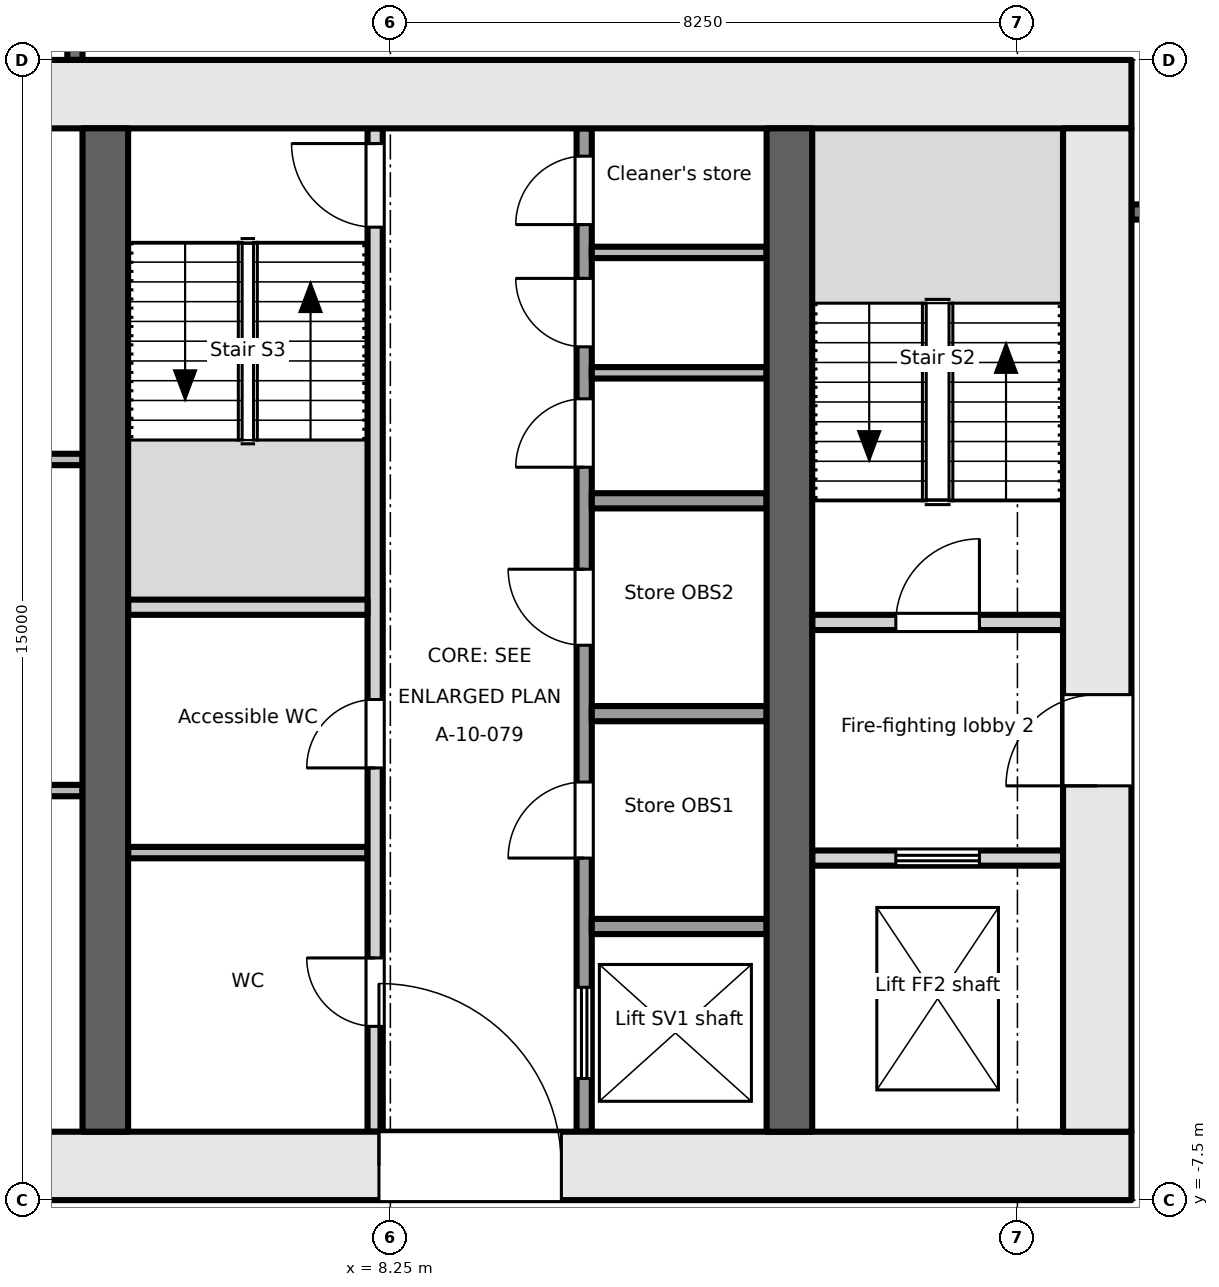
"""IFC4 building model, lengths in metres.
Left out: names, types, materials, properties, quantities, classifications, styles, units other than length and angle.
Written with IfcOpenShell. Run it as: python <this file> out.ifc"""

import sys

from ifc_helpers import new_model, si_unit, direction, frame, frame_2d, origin, place, context, subcontext, project, spatial, rectangle, extrude, element, fill, save


model = new_model("IFC4")
c1 = context("Model", 3, precision=1e-05, world=origin(), true_north=direction((0.0, 1.0)))
c2 = subcontext(c1, "Body", "Model", "MODEL_VIEW")
j1 = project(units=[si_unit("LENGTHUNIT", "METRE"), si_unit("PLANEANGLEUNIT", "RADIAN")], contexts=[c1])
p1 = place(None, origin())
s1 = spatial("IfcSite", under=j1, at=p1, CompositionType="ELEMENT")
p2 = place(p1, origin())
s2 = spatial("IfcBuilding", under=s1, at=p2, CompositionType="ELEMENT")
p3 = place(p2, frame((0.0, 0.0, -9.5)))
s3 = spatial("IfcBuildingStorey", under=s2, at=p3, CompositionType="ELEMENT", Elevation=-9.5)
p4 = place(p3, frame((-18.0, -7.05, -0.2), z_axis=(0.0, 0.0, 1.0), x_axis=(1.0, 0.0, 0.0)))
e1 = element("IfcWall", 1, at=p4, inside=s3, PredefinedType="SHEAR", context=c2, shape_type="SweptSolid", body=[
    extrude(rectangle(XDim=36.0, YDim=0.9, at=frame_2d((18.0, 0.0))), origin(), (0.0, 0.0, 1.0), 4.0),
])
p5 = place(p4, frame((8.4, 0.0, 0.2)))
e2 = element("IfcOpeningElement", 2, at=p5, cuts=e1, PredefinedType="OPENING", context=c2, shape_type="SweptSolid", body=[
    extrude(rectangle(XDim=1.2, YDim=2.1, at=frame_2d((0.6, 1.05))), frame((0.0, 0.46, 0.0), z_axis=(0.0, -1.0, 0.0), x_axis=(1.0, 0.0, 0.0)), (0.0, 0.0, 1.0), 0.921),
])
p6 = place(p4, frame((13.9, 0.0, 0.2)))
e3 = element("IfcOpeningElement", 3, at=p6, cuts=e1, PredefinedType="OPENING", context=c2, shape_type="SweptSolid", body=[
    extrude(rectangle(XDim=1.8, YDim=2.1, at=frame_2d((0.9, 1.05))), frame((0.0, 0.46, 0.0), z_axis=(0.0, -1.0, 0.0), x_axis=(1.0, 0.0, 0.0)), (0.0, 0.0, 1.0), 0.921),
])
p7 = place(p4, frame((26.1, 0.0, 0.2)))
e4 = element("IfcOpeningElement", 4, at=p7, cuts=e1, PredefinedType="OPENING", context=c2, shape_type="SweptSolid", body=[
    extrude(rectangle(XDim=2.4, YDim=2.1, at=frame_2d((1.2, 1.05))), frame((0.0, 0.46, 0.0), z_axis=(0.0, -1.0, 0.0), x_axis=(1.0, 0.0, 0.0)), (0.0, 0.0, 1.0), 0.921),
])
p8 = place(p3, frame((-18.0, 7.05, -0.2), z_axis=(0.0, 0.0, 1.0), x_axis=(1.0, 0.0, 0.0)))
e5 = element("IfcWall", 5, at=p8, inside=s3, PredefinedType="SHEAR", context=c2, shape_type="SweptSolid", body=[
    extrude(rectangle(XDim=36.0, YDim=0.9, at=frame_2d((18.0, 0.0))), origin(), (0.0, 0.0, 1.0), 4.0),
])
p9 = place(p3, frame((17.55, -6.6, -0.2), z_axis=(0.0, 0.0, 1.0), x_axis=(0.0, 1.0, 0.0)))
e6 = element("IfcWall", 6, at=p9, inside=s3, PredefinedType="SHEAR", context=c2, shape_type="SweptSolid", body=[
    extrude(rectangle(XDim=13.2, YDim=0.9, at=frame_2d((6.6, 0.0))), origin(), (0.0, 0.0, 1.0), 4.0),
])
p10 = place(p9, frame((4.55, 0.0, 0.2)))
e7 = element("IfcOpeningElement", 7, at=p10, cuts=e6, PredefinedType="OPENING", context=c2, shape_type="SweptSolid", body=[
    extrude(rectangle(XDim=1.2, YDim=2.1, at=frame_2d((0.6, 1.05))), frame((0.0, 0.46, 0.0), z_axis=(0.0, -1.0, 0.0), x_axis=(1.0, 0.0, 0.0)), (0.0, 0.0, 1.0), 0.921),
])
for number, where, z_axis, x_axis in (
    (8, (4.5, -6.6, -0.2), (0.0, 0.0, 1.0), (0.0, 1.0, 0.0)),
    (9, (13.5, -6.6, -0.2), (0.0, 0.0, 1.0), (0.0, 1.0, 0.0)),
):
    element("IfcWall", number, at=place(p3, frame(where, z_axis=z_axis, x_axis=x_axis)), inside=s3, PredefinedType="SHEAR", context=c2, shape_type="SweptSolid", body=[
        extrude(rectangle(XDim=13.2, YDim=0.6, at=frame_2d((6.6, 0.0))), origin(), (0.0, 0.0, 1.0), 4.0),
    ])
p11 = place(p3, frame((13.8, -3.0, 0.0), z_axis=(0.0, 0.0, 1.0), x_axis=(1.0, 0.0, 0.0)))
e10 = element("IfcWall", 10, at=p11, inside=s3, PredefinedType="PARTITIONING", context=c2, shape_type="SweptSolid", body=[
    extrude(rectangle(XDim=3.3, YDim=0.2, at=frame_2d((1.65, 0.0))), origin(), (0.0, 0.0, 1.0), 3.8),
])
p12 = place(p11, frame((1.1, 0.0, 0.0)))
e11 = element("IfcOpeningElement", 11, at=p12, cuts=e10, PredefinedType="OPENING", context=c2, shape_type="SweptSolid", body=[
    extrude(rectangle(XDim=1.1, YDim=2.1, at=frame_2d((0.55, 1.05))), frame((0.0, 0.111, 0.0), z_axis=(0.0, -1.0, 0.0), x_axis=(1.0, 0.0, 0.0)), (0.0, 0.0, 1.0), 0.221),
])
p13 = place(p3, frame((13.8, 0.1, 0.0), z_axis=(0.0, 0.0, 1.0), x_axis=(1.0, 0.0, 0.0)))
e12 = element("IfcWall", 12, at=p13, inside=s3, PredefinedType="PARTITIONING", context=c2, shape_type="SweptSolid", body=[
    extrude(rectangle(XDim=3.3, YDim=0.2, at=frame_2d((1.65, 0.0))), origin(), (0.0, 0.0, 1.0), 3.8),
])
p14 = place(p13, frame((1.1, 0.0, 0.0)))
e13 = element("IfcOpeningElement", 13, at=p14, cuts=e12, PredefinedType="OPENING", context=c2, shape_type="SweptSolid", body=[
    extrude(rectangle(XDim=1.1, YDim=2.1, at=frame_2d((0.55, 1.05))), frame((0.0, 0.111, 0.0), z_axis=(0.0, -1.0, 0.0), x_axis=(1.0, 0.0, 0.0)), (0.0, 0.0, 1.0), 0.221),
])
for number, where, z_axis, x_axis in (
    (14, (-2.05, -2.112, 0.0), (0.0, 0.0, 1.0), (1.0, 0.0, 0.0)),
    (15, (-2.05, 2.244, 0.0), (0.0, 0.0, 1.0), (1.0, 0.0, 0.0)),
):
    element("IfcWall", number, at=place(p3, frame(where, z_axis=z_axis, x_axis=x_axis)), inside=s3, PredefinedType="PARTITIONING", context=c2, shape_type="SweptSolid", body=[
        extrude(rectangle(XDim=6.25, YDim=0.15, at=frame_2d((3.125, 0.0))), origin(), (0.0, 0.0, 1.0), 3.8),
    ])
p15 = place(p3, frame((8.05, -6.6, 0.0), z_axis=(0.0, 0.0, 1.0), x_axis=(0.0, 1.0, 0.0)))
e16 = element("IfcWall", 16, at=p15, inside=s3, PredefinedType="PARTITIONING", context=c2, shape_type="SweptSolid", body=[
    extrude(rectangle(XDim=13.2, YDim=0.2, at=frame_2d((6.6, 0.0))), origin(), (0.0, 0.0, 1.0), 3.8),
])
p16 = place(p15, frame((1.386, 0.0, 0.0)))
e17 = element("IfcOpeningElement", 17, at=p16, cuts=e16, PredefinedType="OPENING", context=c2, shape_type="SweptSolid", body=[
    extrude(rectangle(XDim=0.9, YDim=2.1, at=frame_2d((0.45, 1.05))), frame((0.0, 0.111, 0.0), z_axis=(0.0, -1.0, 0.0), x_axis=(1.0, 0.0, 0.0)), (0.0, 0.0, 1.0), 0.221),
])
p17 = place(p15, frame((4.786, 0.0, 0.0)))
e18 = element("IfcOpeningElement", 18, at=p17, cuts=e16, PredefinedType="OPENING", context=c2, shape_type="SweptSolid", body=[
    extrude(rectangle(XDim=0.9, YDim=2.1, at=frame_2d((0.45, 1.05))), frame((0.0, 0.111, 0.0), z_axis=(0.0, -1.0, 0.0), x_axis=(1.0, 0.0, 0.0)), (0.0, 0.0, 1.0), 0.221),
])
p18 = place(p15, frame((11.9, 0.0, 0.0)))
e19 = element("IfcOpeningElement", 19, at=p18, cuts=e16, PredefinedType="OPENING", context=c2, shape_type="SweptSolid", body=[
    extrude(rectangle(XDim=1.1, YDim=2.1, at=frame_2d((0.55, 1.05))), frame((0.0, 0.111, 0.0), z_axis=(0.0, -1.0, 0.0), x_axis=(1.0, 0.0, 0.0)), (0.0, 0.0, 1.0), 0.221),
])
p19 = place(p3, frame((10.8, -6.6, 0.0), z_axis=(0.0, 0.0, 1.0), x_axis=(0.0, 1.0, 0.0)))
e20 = element("IfcWall", 20, at=p19, inside=s3, PredefinedType="PARTITIONING", context=c2, shape_type="SweptSolid", body=[
    extrude(rectangle(XDim=13.2, YDim=0.2, at=frame_2d((6.6, 0.0))), origin(), (0.0, 0.0, 1.0), 3.8),
])
p20 = place(p19, frame((0.7, 0.0, 0.0)))
e21 = element("IfcOpeningElement", 21, at=p20, cuts=e20, PredefinedType="OPENING", context=c2, shape_type="SweptSolid", body=[
    extrude(rectangle(XDim=1.2, YDim=2.1, at=frame_2d((0.6, 1.05))), frame((0.0, 0.111, 0.0), z_axis=(0.0, -1.0, 0.0), x_axis=(1.0, 0.0, 0.0)), (0.0, 0.0, 1.0), 0.221),
])
p21 = place(p19, frame((3.6, 0.0, 0.0)))
e22 = element("IfcOpeningElement", 22, at=p21, cuts=e20, PredefinedType="OPENING", context=c2, shape_type="SweptSolid", body=[
    extrude(rectangle(XDim=1.0, YDim=2.1, at=frame_2d((0.5, 1.05))), frame((0.0, 0.111, 0.0), z_axis=(0.0, -1.0, 0.0), x_axis=(1.0, 0.0, 0.0)), (0.0, 0.0, 1.0), 0.221),
])
p22 = place(p19, frame((6.4, 0.0, 0.0)))
e23 = element("IfcOpeningElement", 23, at=p22, cuts=e20, PredefinedType="OPENING", context=c2, shape_type="SweptSolid", body=[
    extrude(rectangle(XDim=1.0, YDim=2.1, at=frame_2d((0.5, 1.05))), frame((0.0, 0.111, 0.0), z_axis=(0.0, -1.0, 0.0), x_axis=(1.0, 0.0, 0.0)), (0.0, 0.0, 1.0), 0.221),
])
p23 = place(p19, frame((8.742, 0.0, 0.0)))
e24 = element("IfcOpeningElement", 24, at=p23, cuts=e20, PredefinedType="OPENING", context=c2, shape_type="SweptSolid", body=[
    extrude(rectangle(XDim=0.9, YDim=2.1, at=frame_2d((0.45, 1.05))), frame((0.0, 0.111, 0.0), z_axis=(0.0, -1.0, 0.0), x_axis=(1.0, 0.0, 0.0)), (0.0, 0.0, 1.0), 0.221),
])
p24 = place(p19, frame((10.326, 0.0, 0.0)))
e25 = element("IfcOpeningElement", 25, at=p24, cuts=e20, PredefinedType="OPENING", context=c2, shape_type="SweptSolid", body=[
    extrude(rectangle(XDim=0.9, YDim=2.1, at=frame_2d((0.45, 1.05))), frame((0.0, 0.111, 0.0), z_axis=(0.0, -1.0, 0.0), x_axis=(1.0, 0.0, 0.0)), (0.0, 0.0, 1.0), 0.221),
])
p25 = place(p19, frame((11.934, 0.0, 0.0)))
e26 = element("IfcOpeningElement", 26, at=p25, cuts=e20, PredefinedType="OPENING", context=c2, shape_type="SweptSolid", body=[
    extrude(rectangle(XDim=0.9, YDim=2.1, at=frame_2d((0.45, 1.05))), frame((0.0, 0.111, 0.0), z_axis=(0.0, -1.0, 0.0), x_axis=(1.0, 0.0, 0.0)), (0.0, 0.0, 1.0), 0.221),
])
p26 = place(p3, frame((4.8, 0.3, 0.0), z_axis=(0.0, 0.0, 1.0), x_axis=(1.0, 0.0, 0.0)))
e27 = element("IfcWall", 27, at=p26, inside=s3, PredefinedType="PARTITIONING", context=c2, shape_type="SweptSolid", body=[
    extrude(rectangle(XDim=3.15, YDim=0.2, at=frame_2d((1.575, 0.0))), origin(), (0.0, 0.0, 1.0), 3.8),
])
p27 = place(p3, frame((4.8, -2.928, 0.0), z_axis=(0.0, 0.0, 1.0), x_axis=(1.0, 0.0, 0.0)))
e28 = element("IfcWall", 28, at=p27, inside=s3, PredefinedType="PARTITIONING", context=c2, shape_type="SweptSolid", body=[
    extrude(rectangle(XDim=3.15, YDim=0.15, at=frame_2d((1.575, 0.0))), origin(), (0.0, 0.0, 1.0), 3.8),
])
for number, where, z_axis, x_axis in (
    (29, (10.9, -3.9, 0.0), (0.0, 0.0, 1.0), (1.0, 0.0, 0.0)),
    (30, (10.9, -1.1, 0.0), (0.0, 0.0, 1.0), (1.0, 0.0, 0.0)),
    (31, (10.9, 1.7, 0.0), (0.0, 0.0, 1.0), (1.0, 0.0, 0.0)),
):
    element("IfcWall", number, at=place(p3, frame(where, z_axis=z_axis, x_axis=x_axis)), inside=s3, PredefinedType="PARTITIONING", context=c2, shape_type="SweptSolid", body=[
        extrude(rectangle(XDim=2.3, YDim=0.2, at=frame_2d((1.15, 0.0))), origin(), (0.0, 0.0, 1.0), 3.8),
    ])
for number, where, z_axis, x_axis in (
    (32, (10.9, 3.384, 0.0), (0.0, 0.0, 1.0), (1.0, 0.0, 0.0)),
    (33, (10.9, 4.968, 0.0), (0.0, 0.0, 1.0), (1.0, 0.0, 0.0)),
):
    element("IfcWall", number, at=place(p3, frame(where, z_axis=z_axis, x_axis=x_axis)), inside=s3, PredefinedType="PARTITIONING", context=c2, shape_type="SweptSolid", body=[
        extrude(rectangle(XDim=2.3, YDim=0.15, at=frame_2d((1.15, 0.0))), origin(), (0.0, 0.0, 1.0), 3.8),
    ])
p28 = place(p3, frame((18.0, 5.5, 0.0), z_axis=(0.0, 0.0, 1.0), x_axis=(1.0, 0.0, 0.0)))
e34 = element("IfcWall", 34, at=p28, inside=s3, PredefinedType="PARTITIONING", context=c2, shape_type="SweptSolid", body=[
    extrude(rectangle(XDim=2.4, YDim=0.2, at=frame_2d((1.2, 0.0))), origin(), (0.0, 0.0, 1.0), 3.8),
])
p29 = place(p28, frame((0.75, 0.0, 0.0)))
e35 = element("IfcOpeningElement", 35, at=p29, cuts=e34, PredefinedType="OPENING", context=c2, shape_type="SweptSolid", body=[
    extrude(rectangle(XDim=0.9, YDim=2.1, at=frame_2d((0.45, 1.05))), frame((0.0, 0.111, 0.0), z_axis=(0.0, -1.0, 0.0), x_axis=(1.0, 0.0, 0.0)), (0.0, 0.0, 1.0), 0.221),
])
p30 = place(p3, frame((4.1, 13.74, 0.0), z_axis=(0.0, 0.0, 1.0), x_axis=(0.0, -1.0, 0.0)))
e36 = element("IfcWall", 36, at=p30, inside=s3, PredefinedType="PARTITIONING", context=c2, shape_type="SweptSolid", body=[
    extrude(rectangle(XDim=6.24, YDim=0.2, at=frame_2d((3.12, 0.0))), origin(), (0.0, 0.0, 1.0), 2.8),
])
p31 = place(p12, origin())
e37 = element("IfcDoor", 37, at=p31, inside=s3, OperationType="DOUBLE_DOOR_SLIDING", PredefinedType="DOOR", context=c2, shape_type="SweptSolid", body=[
    extrude(rectangle(XDim=1.1, YDim=2.1, at=frame_2d((0.55, 1.05))), frame((0.0, 0.025, 0.0), z_axis=(0.0, -1.0, 0.0), x_axis=(1.0, 0.0, 0.0)), (0.0, 0.0, 1.0), 0.05),
])
fill(e11, e37)
p32 = place(p10, origin())
e38 = element("IfcDoor", 38, at=p32, inside=s3, OperationType="SINGLE_SWING_LEFT", PredefinedType="DOOR", context=c2, shape_type="SweptSolid", body=[
    extrude(rectangle(XDim=1.2, YDim=2.1, at=frame_2d((0.6, 1.05))), frame((0.0, 0.025, 0.0), z_axis=(0.0, -1.0, 0.0), x_axis=(1.0, 0.0, 0.0)), (0.0, 0.0, 1.0), 0.05),
])
fill(e7, e38)
p33 = place(p14, origin())
e39 = element("IfcDoor", 39, at=p33, inside=s3, OperationType="SINGLE_SWING_RIGHT", PredefinedType="DOOR", context=c2, shape_type="SweptSolid", body=[
    extrude(rectangle(XDim=1.1, YDim=2.1, at=frame_2d((0.55, 1.05))), frame((0.0, 0.025, 0.0), z_axis=(0.0, -1.0, 0.0), x_axis=(1.0, 0.0, 0.0)), (0.0, 0.0, 1.0), 0.05),
])
fill(e13, e39)
p34 = place(p16, origin())
e40 = element("IfcDoor", 40, at=p34, inside=s3, OperationType="SINGLE_SWING_RIGHT", PredefinedType="DOOR", context=c2, shape_type="SweptSolid", body=[
    extrude(rectangle(XDim=0.9, YDim=2.1, at=frame_2d((0.45, 1.05))), frame((0.0, 0.025, 0.0), z_axis=(0.0, -1.0, 0.0), x_axis=(1.0, 0.0, 0.0)), (0.0, 0.0, 1.0), 0.05),
])
fill(e17, e40)
p35 = place(p17, origin())
e41 = element("IfcDoor", 41, at=p35, inside=s3, OperationType="SINGLE_SWING_LEFT", PredefinedType="DOOR", context=c2, shape_type="SweptSolid", body=[
    extrude(rectangle(XDim=0.9, YDim=2.1, at=frame_2d((0.45, 1.05))), frame((0.0, 0.025, 0.0), z_axis=(0.0, -1.0, 0.0), x_axis=(1.0, 0.0, 0.0)), (0.0, 0.0, 1.0), 0.05),
])
fill(e18, e41)
p36 = place(p18, origin())
e42 = element("IfcDoor", 42, at=p36, inside=s3, OperationType="SINGLE_SWING_RIGHT", PredefinedType="DOOR", context=c2, shape_type="SweptSolid", body=[
    extrude(rectangle(XDim=1.1, YDim=2.1, at=frame_2d((0.55, 1.05))), frame((0.0, 0.025, 0.0), z_axis=(0.0, -1.0, 0.0), x_axis=(1.0, 0.0, 0.0)), (0.0, 0.0, 1.0), 0.05),
])
fill(e19, e42)
p37 = place(p7, origin())
e43 = element("IfcDoor", 43, at=p37, inside=s3, OperationType="DOUBLE_DOOR_DOUBLE_SWING", PredefinedType="DOOR", context=c2, shape_type="SweptSolid", body=[
    extrude(rectangle(XDim=2.4, YDim=2.1, at=frame_2d((1.2, 1.05))), frame((0.0, 0.025, 0.0), z_axis=(0.0, -1.0, 0.0), x_axis=(1.0, 0.0, 0.0)), (0.0, 0.0, 1.0), 0.05),
])
fill(e4, e43)
p38 = place(p20, origin())
e44 = element("IfcDoor", 44, at=p38, inside=s3, OperationType="DOUBLE_DOOR_SLIDING", PredefinedType="DOOR", context=c2, shape_type="SweptSolid", body=[
    extrude(rectangle(XDim=1.2, YDim=2.1, at=frame_2d((0.6, 1.05))), frame((0.0, 0.025, 0.0), z_axis=(0.0, -1.0, 0.0), x_axis=(1.0, 0.0, 0.0)), (0.0, 0.0, 1.0), 0.05),
])
fill(e21, e44)
p39 = place(p21, origin())
e45 = element("IfcDoor", 45, at=p39, inside=s3, OperationType="SINGLE_SWING_LEFT", PredefinedType="DOOR", context=c2, shape_type="SweptSolid", body=[
    extrude(rectangle(XDim=1.0, YDim=2.1, at=frame_2d((0.5, 1.05))), frame((0.0, 0.025, 0.0), z_axis=(0.0, -1.0, 0.0), x_axis=(1.0, 0.0, 0.0)), (0.0, 0.0, 1.0), 0.05),
])
fill(e22, e45)
p40 = place(p22, origin())
e46 = element("IfcDoor", 46, at=p40, inside=s3, OperationType="SINGLE_SWING_RIGHT", PredefinedType="DOOR", context=c2, shape_type="SweptSolid", body=[
    extrude(rectangle(XDim=1.0, YDim=2.1, at=frame_2d((0.5, 1.05))), frame((0.0, 0.025, 0.0), z_axis=(0.0, -1.0, 0.0), x_axis=(1.0, 0.0, 0.0)), (0.0, 0.0, 1.0), 0.05),
])
fill(e23, e46)
p41 = place(p23, origin())
e47 = element("IfcDoor", 47, at=p41, inside=s3, OperationType="SINGLE_SWING_LEFT", PredefinedType="DOOR", context=c2, shape_type="SweptSolid", body=[
    extrude(rectangle(XDim=0.9, YDim=2.1, at=frame_2d((0.45, 1.05))), frame((0.0, 0.025, 0.0), z_axis=(0.0, -1.0, 0.0), x_axis=(1.0, 0.0, 0.0)), (0.0, 0.0, 1.0), 0.05),
])
fill(e24, e47)
p42 = place(p24, origin())
e48 = element("IfcDoor", 48, at=p42, inside=s3, OperationType="SINGLE_SWING_RIGHT", PredefinedType="DOOR", context=c2, shape_type="SweptSolid", body=[
    extrude(rectangle(XDim=0.9, YDim=2.1, at=frame_2d((0.45, 1.05))), frame((0.0, 0.025, 0.0), z_axis=(0.0, -1.0, 0.0), x_axis=(1.0, 0.0, 0.0)), (0.0, 0.0, 1.0), 0.05),
])
fill(e25, e48)
p43 = place(p25, origin())
e49 = element("IfcDoor", 49, at=p43, inside=s3, OperationType="SINGLE_SWING_LEFT", PredefinedType="DOOR", context=c2, shape_type="SweptSolid", body=[
    extrude(rectangle(XDim=0.9, YDim=2.1, at=frame_2d((0.45, 1.05))), frame((0.0, 0.025, 0.0), z_axis=(0.0, -1.0, 0.0), x_axis=(1.0, 0.0, 0.0)), (0.0, 0.0, 1.0), 0.05),
])
fill(e26, e49)
save(model, sys.argv[1])
